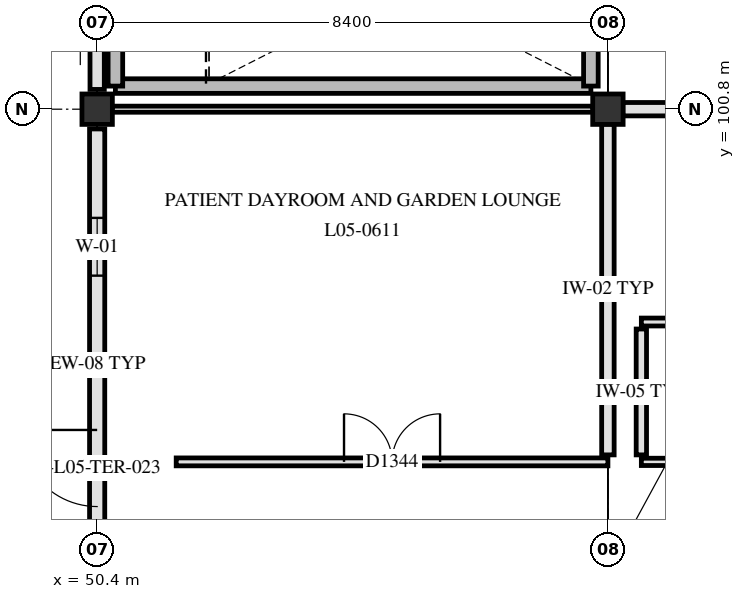
"""IFC4 building model, lengths in metres.
Left out: names, types, materials, properties, quantities, classifications, styles, units other than length and angle.
Written with IfcOpenShell. Run it as: python <this file> out.ifc"""

import sys

from ifc_helpers import new_model, si_unit, direction, frame, frame_2d, origin, origin_2d, place, context, subcontext, project, spatial, rectangle, extrude, element, fill, save


model = new_model("IFC4")
c1 = context("Model", 3, precision=1e-05, world=origin(), true_north=direction((0.0, 1.0)))
c2 = subcontext(c1, "Body", "Model", "MODEL_VIEW")
j1 = project(units=[si_unit("LENGTHUNIT", "METRE"), si_unit("PLANEANGLEUNIT", "RADIAN")], contexts=[c1])
p1 = place(None, origin())
s1 = spatial("IfcSite", under=j1, at=p1, CompositionType="ELEMENT")
p2 = place(p1, origin())
s2 = spatial("IfcBuilding", under=s1, at=p2, CompositionType="ELEMENT")
p3 = place(p2, frame((0.0, 0.0, 22.5)))
s3 = spatial("IfcBuildingStorey", under=s2, at=p3, CompositionType="ELEMENT", Elevation=22.5)
for number, where, z_axis, x_axis in (
    (1, (50.4, 100.8, 0.0), (0.0, 0.0, 1.0), (1.0, 0.0, 0.0)),
    (2, (58.8, 100.8, 0.0), (0.0, 0.0, 1.0), (1.0, 0.0, 0.0)),
):
    element("IfcColumn", number, at=place(p3, frame(where, z_axis=z_axis, x_axis=x_axis)), inside=s3, PredefinedType="COLUMN", context=c2, shape_type="SweptSolid", body=[
        extrude(rectangle(XDim=0.5, YDim=0.5, at=origin_2d()), origin(), (0.0, 0.0, 1.0), 3.9),
    ])
p4 = place(p3, frame((50.4, 92.725, 0.0), z_axis=(0.0, 0.0, 1.0), x_axis=(0.0, 1.0, 0.0)))
e3 = element("IfcWall", 3, at=p4, inside=s3, PredefinedType="SOLIDWALL", context=c2, shape_type="SweptSolid", body=[
    extrude(rectangle(XDim=7.75, YDim=0.25, at=frame_2d((3.875, 0.0))), origin(), (0.0, 0.0, 1.0), 3.37),
])
p5 = place(p4, frame((1.54, 0.0, 0.0)))
e4 = element("IfcOpeningElement", 4, at=p5, cuts=e3, PredefinedType="OPENING", context=c2, shape_type="SweptSolid", body=[
    extrude(rectangle(XDim=1.26, YDim=2.15, at=frame_2d((0.63, 1.075))), frame((0.0, 0.135, 0.0), z_axis=(0.0, -1.0, 0.0), x_axis=(1.0, 0.0, 0.0)), (0.0, 0.0, 1.0), 0.27),
])
p6 = place(p4, frame((5.337, 0.0, 0.85)))
e5 = element("IfcOpeningElement", 5, at=p6, cuts=e3, PredefinedType="OPENING", context=c2, shape_type="SweptSolid", body=[
    extrude(rectangle(XDim=0.95, YDim=1.3, at=frame_2d((0.475, 0.65))), frame((0.0, 0.135, 0.0), z_axis=(0.0, -1.0, 0.0), x_axis=(1.0, 0.0, 0.0)), (0.0, 0.0, 1.0), 0.27),
])
p7 = place(p3, frame((50.4, 101.125, 0.0), z_axis=(0.0, 0.0, 1.0), x_axis=(0.0, 1.0, 0.0)))
e6 = element("IfcWall", 6, at=p7, inside=s3, PredefinedType="SOLIDWALL", context=c2, shape_type="SweptSolid", body=[
    extrude(rectangle(XDim=7.75, YDim=0.235, at=frame_2d((3.875, 0.0))), origin(), (0.0, 0.0, 1.0), 3.37),
])
p8 = place(p7, frame((1.413, 0.0, 0.85)))
e7 = element("IfcOpeningElement", 7, at=p8, cuts=e6, PredefinedType="OPENING", context=c2, shape_type="SweptSolid", body=[
    extrude(rectangle(XDim=1.05, YDim=1.54, at=frame_2d((0.525, 0.77))), frame((0.0, 0.127, 0.0), z_axis=(0.0, -1.0, 0.0), x_axis=(1.0, 0.0, 0.0)), (0.0, 0.0, 1.0), 0.255),
])
p9 = place(p7, frame((5.238, 0.0, 0.85)))
e8 = element("IfcOpeningElement", 8, at=p9, cuts=e6, PredefinedType="OPENING", context=c2, shape_type="SweptSolid", body=[
    extrude(rectangle(XDim=1.15, YDim=1.54, at=frame_2d((0.575, 0.77))), frame((0.0, 0.127, 0.0), z_axis=(0.0, -1.0, 0.0), x_axis=(1.0, 0.0, 0.0)), (0.0, 0.0, 1.0), 0.255),
])
p10 = place(p3, frame((50.7, 101.18, 0.0), z_axis=(0.0, 0.0, 1.0), x_axis=(1.0, 0.0, 0.0)))
e9 = element("IfcWall", 9, at=p10, inside=s3, PredefinedType="SHEAR", context=c2, shape_type="SweptSolid", body=[
    extrude(rectangle(XDim=7.82, YDim=0.24, at=frame_2d((3.91, 0.0))), origin(), (0.0, 0.0, 1.0), 3.62),
])
for number, where, z_axis, x_axis in (
    (10, (50.7, 101.18, 0.0), (0.0, 0.0, 1.0), (0.0, 1.0, 0.0)),
    (11, (58.52, 101.18, 0.0), (0.0, 0.0, 1.0), (0.0, 1.0, 0.0)),
):
    element("IfcWall", number, at=place(p3, frame(where, z_axis=z_axis, x_axis=x_axis)), inside=s3, PredefinedType="SHEAR", context=c2, shape_type="SweptSolid", body=[
        extrude(rectangle(XDim=3.32, YDim=0.24, at=frame_2d((1.66, 0.0))), origin(), (0.0, 0.0, 1.0), 3.62),
    ])
p11 = place(p3, frame((51.7, 95.0, 0.0), z_axis=(0.0, 0.0, 1.0), x_axis=(1.0, 0.0, 0.0)))
e12 = element("IfcWall", 12, at=p11, inside=s3, PredefinedType="PARTITIONING", context=c2, shape_type="SweptSolid", body=[
    extrude(rectangle(XDim=7.1, YDim=0.13, at=frame_2d((3.55, 0.0))), origin(), (0.0, 0.0, 1.0), 3.29),
])
p12 = place(p11, frame((2.76, 0.0, 0.0)))
e13 = element("IfcOpeningElement", 13, at=p12, cuts=e12, PredefinedType="OPENING", context=c2, shape_type="SweptSolid", body=[
    extrude(rectangle(XDim=1.58, YDim=2.22, at=frame_2d((0.79, 1.11))), frame((0.0, 0.075, 0.0), z_axis=(0.0, -1.0, 0.0), x_axis=(1.0, 0.0, 0.0)), (0.0, 0.0, 1.0), 0.15),
])
p13 = place(p3, frame((59.35, 95.0, 0.0), z_axis=(0.0, 0.0, 1.0), x_axis=(1.0, 0.0, 0.0)))
e14 = element("IfcWall", 14, at=p13, inside=s3, PredefinedType="PARTITIONING", context=c2, shape_type="SweptSolid", body=[
    extrude(rectangle(XDim=3.05, YDim=0.12, at=frame_2d((1.525, 0.0))), origin(), (0.0, 0.0, 1.0), 3.61),
])
p14 = place(p3, frame((59.35, 97.3, 0.0), z_axis=(0.0, 0.0, 1.0), x_axis=(1.0, 0.0, 0.0)))
e15 = element("IfcWall", 15, at=p14, inside=s3, PredefinedType="PARTITIONING", context=c2, shape_type="SweptSolid", body=[
    extrude(rectangle(XDim=3.05, YDim=0.13, at=frame_2d((1.525, 0.0))), origin(), (0.0, 0.0, 1.0), 3.61),
])
p15 = place(p14, frame((1.05, 0.0, 0.0)))
e16 = element("IfcOpeningElement", 16, at=p15, cuts=e15, PredefinedType="OPENING", context=c2, shape_type="SweptSolid", body=[
    extrude(rectangle(XDim=0.95, YDim=2.1, at=frame_2d((0.475, 1.05))), frame((0.0, 0.075, 0.0), z_axis=(0.0, -1.0, 0.0), x_axis=(1.0, 0.0, 0.0)), (0.0, 0.0, 1.0), 0.15),
])
p16 = place(p3, frame((50.645, 100.8, 0.0), z_axis=(0.0, 0.0, 1.0), x_axis=(1.0, 0.0, 0.0)))
e17 = element("IfcWall", 17, at=p16, inside=s3, PredefinedType="PARTITIONING", context=c2, shape_type="SweptSolid", body=[
    extrude(rectangle(XDim=7.91, YDim=0.1, at=frame_2d((3.955, 0.0))), origin(), (0.0, 0.0, 1.0), 3.15),
])
p17 = place(p3, frame((59.045, 100.8, 0.0), z_axis=(0.0, 0.0, 1.0), x_axis=(1.0, 0.0, 0.0)))
e18 = element("IfcWall", 18, at=p17, inside=s3, PredefinedType="PARTITIONING", context=c2, shape_type="SweptSolid", body=[
    extrude(rectangle(XDim=7.86, YDim=0.22, at=frame_2d((3.93, 0.0))), origin(), (0.0, 0.0, 1.0), 3.15),
])
p18 = place(p3, frame((58.8, 95.115, 0.0), z_axis=(0.0, 0.0, 1.0), x_axis=(0.0, 1.0, 0.0)))
e19 = element("IfcWall", 19, at=p18, inside=s3, PredefinedType="PARTITIONING", context=c2, shape_type="SweptSolid", body=[
    extrude(rectangle(XDim=5.44, YDim=0.205, at=frame_2d((2.72, 0.0))), origin(), (0.0, 0.0, 1.0), 3.29),
])
p19 = place(p3, frame((59.35, 95.115, 0.0), z_axis=(0.0, 0.0, 1.0), x_axis=(0.0, 1.0, 0.0)))
e20 = element("IfcWall", 20, at=p19, inside=s3, PredefinedType="PARTITIONING", context=c2, shape_type="SweptSolid", body=[
    extrude(rectangle(XDim=2.07, YDim=0.17, at=frame_2d((1.035, 0.0))), origin(), (0.0, 0.0, 1.0), 3.33),
])
p20 = place(p5, origin())
e21 = element("IfcDoor", 21, at=p20, inside=s3, OperationType="SINGLE_SWING_RIGHT", PredefinedType="DOOR", context=c2, shape_type="SweptSolid", body=[
    extrude(rectangle(XDim=1.26, YDim=2.15, at=frame_2d((0.63, 1.075))), frame((0.0, 0.025, 0.0), z_axis=(0.0, -1.0, 0.0), x_axis=(1.0, 0.0, 0.0)), (0.0, 0.0, 1.0), 0.05),
])
fill(e4, e21)
p21 = place(p6, origin())
e22 = element("IfcWindow", 22, at=p21, inside=s3, PartitioningType="SINGLE_PANEL", PredefinedType="WINDOW", context=c2, shape_type="SweptSolid", body=[
    extrude(rectangle(XDim=0.95, YDim=1.3, at=frame_2d((0.475, 0.65))), frame((0.0, 0.03, 0.0), z_axis=(0.0, -1.0, 0.0), x_axis=(1.0, 0.0, 0.0)), (0.0, 0.0, 1.0), 0.06),
])
fill(e5, e22)
p22 = place(p12, origin())
e23 = element("IfcDoor", 23, at=p22, inside=s3, OperationType="DOUBLE_SWING_LEFT", PredefinedType="DOOR", context=c2, shape_type="SweptSolid", body=[
    extrude(rectangle(XDim=1.58, YDim=2.22, at=frame_2d((0.79, 1.11))), frame((0.0, 0.025, 0.0), z_axis=(0.0, -1.0, 0.0), x_axis=(1.0, 0.0, 0.0)), (0.0, 0.0, 1.0), 0.05),
])
fill(e13, e23)
save(model, sys.argv[1])
